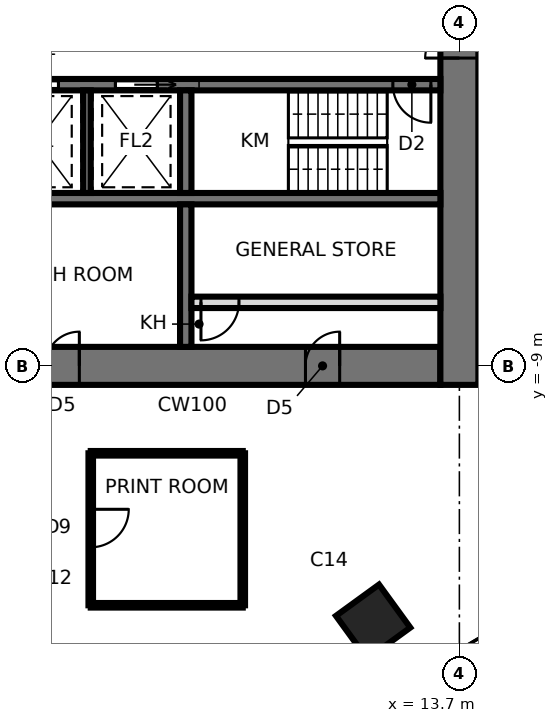
"""IFC4 building model, lengths in metres.
Left out: names, types, materials, properties, quantities, classifications, styles, units other than length and angle.
Written with IfcOpenShell. Run it as: python <this file> out.ifc"""

import sys

from ifc_helpers import new_model, si_unit, direction, frame, frame_2d, origin, origin_2d, place, context, subcontext, project, spatial, rectangle, extrude, element, fill, save


model = new_model("IFC4")
c1 = context("Model", 3, precision=1e-05, world=origin(), true_north=direction((0.0, 1.0)))
c2 = subcontext(c1, "Body", "Model", "MODEL_VIEW")
j1 = project(units=[si_unit("LENGTHUNIT", "METRE"), si_unit("PLANEANGLEUNIT", "RADIAN")], contexts=[c1])
p1 = place(None, origin())
s1 = spatial("IfcSite", under=j1, at=p1, CompositionType="ELEMENT")
p2 = place(p1, origin())
s2 = spatial("IfcBuilding", under=s1, at=p2, CompositionType="ELEMENT")
p3 = place(p2, frame((0.0, 0.0, 234.5)))
s3 = spatial("IfcBuildingStorey", under=s2, at=p3, CompositionType="ELEMENT", Elevation=234.5)
p4 = place(p3, frame((11.43, -15.733, 0.0), z_axis=(0.0, 0.0, 1.0), x_axis=(0.587785252292, -0.809016994375, 0.0)))
e1 = element("IfcColumn", 1, at=p4, inside=s3, PredefinedType="COLUMN", context=c2, shape_type="SweptSolid", body=[
    extrude(rectangle(XDim=1.4, YDim=1.4, at=origin_2d()), origin(), (0.0, 0.0, 1.0), 3.9),
])
p5 = place(p3, frame((-13.2, -9.0, 0.0), z_axis=(0.0, 0.0, 1.0), x_axis=(1.0, 0.0, 0.0)))
e2 = element("IfcWall", 2, at=p5, inside=s3, PredefinedType="SHEAR", context=c2, shape_type="SweptSolid", body=[
    extrude(rectangle(XDim=26.4, YDim=1.0, at=frame_2d((13.2, 0.0))), origin(), (0.0, 0.0, 1.0), 3.9),
])
p6 = place(p5, frame((2.65, 0.0, 0.0)))
e3 = element("IfcOpeningElement", 3, at=p6, cuts=e2, PredefinedType="OPENING", context=c2, shape_type="SweptSolid", body=[
    extrude(rectangle(XDim=0.9, YDim=2.1, at=frame_2d((0.45, 1.05))), frame((0.0, 0.51, 0.0), z_axis=(0.0, -1.0, 0.0), x_axis=(1.0, 0.0, 0.0)), (0.0, 0.0, 1.0), 1.02),
])
p7 = place(p5, frame((9.5, 0.0, 0.0)))
e4 = element("IfcOpeningElement", 4, at=p7, cuts=e2, PredefinedType="OPENING", context=c2, shape_type="SweptSolid", body=[
    extrude(rectangle(XDim=0.9, YDim=2.1, at=frame_2d((0.45, 1.05))), frame((0.0, 0.51, 0.0), z_axis=(0.0, -1.0, 0.0), x_axis=(1.0, 0.0, 0.0)), (0.0, 0.0, 1.0), 1.02),
])
p8 = place(p5, frame((16.0, 0.0, 0.0)))
e5 = element("IfcOpeningElement", 5, at=p8, cuts=e2, PredefinedType="OPENING", context=c2, shape_type="SweptSolid", body=[
    extrude(rectangle(XDim=0.9, YDim=2.1, at=frame_2d((0.45, 1.05))), frame((0.0, 0.51, 0.0), z_axis=(0.0, -1.0, 0.0), x_axis=(1.0, 0.0, 0.0)), (0.0, 0.0, 1.0), 1.02),
])
p9 = place(p5, frame((22.85, 0.0, 0.0)))
e6 = element("IfcOpeningElement", 6, at=p9, cuts=e2, PredefinedType="OPENING", context=c2, shape_type="SweptSolid", body=[
    extrude(rectangle(XDim=0.9, YDim=2.1, at=frame_2d((0.45, 1.05))), frame((0.0, 0.51, 0.0), z_axis=(0.0, -1.0, 0.0), x_axis=(1.0, 0.0, 0.0)), (0.0, 0.0, 1.0), 1.02),
])
p10 = place(p3, frame((13.7, -9.5, 0.0), z_axis=(0.0, 0.0, 1.0), x_axis=(0.0, 1.0, 0.0)))
e7 = element("IfcWall", 7, at=p10, inside=s3, PredefinedType="SHEAR", context=c2, shape_type="SweptSolid", body=[
    extrude(rectangle(XDim=19.0, YDim=1.0, at=frame_2d((9.5, 0.0))), origin(), (0.0, 0.0, 1.0), 3.9),
])
p11 = place(p10, frame((8.6, 0.0, 0.0)))
e8 = element("IfcOpeningElement", 8, at=p11, cuts=e7, PredefinedType="OPENING", context=c2, shape_type="SweptSolid", body=[
    extrude(rectangle(XDim=1.8, YDim=2.4, at=frame_2d((0.9, 1.2))), frame((0.0, 0.51, 0.0), z_axis=(0.0, -1.0, 0.0), x_axis=(1.0, 0.0, 0.0)), (0.0, 0.0, 1.0), 1.02),
])
p12 = place(p3, frame((-13.2, -1.6, 0.0), z_axis=(0.0, 0.0, 1.0), x_axis=(1.0, 0.0, 0.0)))
e9 = element("IfcWall", 9, at=p12, inside=s3, PredefinedType="SHEAR", context=c2, shape_type="SweptSolid", body=[
    extrude(rectangle(XDim=26.4, YDim=0.3, at=frame_2d((13.2, 0.0))), origin(), (0.0, 0.0, 1.0), 3.9),
])
p13 = place(p12, frame((25.15, 0.0, 0.0)))
e10 = element("IfcOpeningElement", 10, at=p13, cuts=e9, PredefinedType="OPENING", context=c2, shape_type="SweptSolid", body=[
    extrude(rectangle(XDim=1.0, YDim=2.1, at=frame_2d((0.5, 1.05))), frame((0.0, 0.16, 0.0), z_axis=(0.0, -1.0, 0.0), x_axis=(1.0, 0.0, 0.0)), (0.0, 0.0, 1.0), 0.32),
])
p14 = place(p12, frame((7.55, 0.0, 0.0)))
e11 = element("IfcOpeningElement", 11, at=p14, cuts=e9, PredefinedType="OPENING", context=c2, shape_type="SweptSolid", body=[
    extrude(rectangle(XDim=0.9, YDim=2.1, at=frame_2d((0.45, 1.05))), frame((0.0, 0.16, 0.0), z_axis=(0.0, -1.0, 0.0), x_axis=(1.0, 0.0, 0.0)), (0.0, 0.0, 1.0), 0.32),
])
p15 = place(p12, frame((10.15, 0.0, 0.0)))
e12 = element("IfcOpeningElement", 12, at=p15, cuts=e9, PredefinedType="OPENING", context=c2, shape_type="SweptSolid", body=[
    extrude(rectangle(XDim=0.9, YDim=2.1, at=frame_2d((0.45, 1.05))), frame((0.0, 0.16, 0.0), z_axis=(0.0, -1.0, 0.0), x_axis=(1.0, 0.0, 0.0)), (0.0, 0.0, 1.0), 0.32),
])
p16 = place(p12, frame((12.75, 0.0, 0.0)))
e13 = element("IfcOpeningElement", 13, at=p16, cuts=e9, PredefinedType="OPENING", context=c2, shape_type="SweptSolid", body=[
    extrude(rectangle(XDim=0.9, YDim=2.1, at=frame_2d((0.45, 1.05))), frame((0.0, 0.16, 0.0), z_axis=(0.0, -1.0, 0.0), x_axis=(1.0, 0.0, 0.0)), (0.0, 0.0, 1.0), 0.32),
])
p17 = place(p12, frame((15.25, 0.0, 0.0)))
e14 = element("IfcOpeningElement", 14, at=p17, cuts=e9, PredefinedType="OPENING", context=c2, shape_type="SweptSolid", body=[
    extrude(rectangle(XDim=1.1, YDim=2.3, at=frame_2d((0.55, 1.15))), frame((0.0, 0.16, 0.0), z_axis=(0.0, -1.0, 0.0), x_axis=(1.0, 0.0, 0.0)), (0.0, 0.0, 1.0), 0.32),
])
p18 = place(p12, frame((17.85, 0.0, 0.0)))
e15 = element("IfcOpeningElement", 15, at=p18, cuts=e9, PredefinedType="OPENING", context=c2, shape_type="SweptSolid", body=[
    extrude(rectangle(XDim=1.1, YDim=2.3, at=frame_2d((0.55, 1.15))), frame((0.0, 0.16, 0.0), z_axis=(0.0, -1.0, 0.0), x_axis=(1.0, 0.0, 0.0)), (0.0, 0.0, 1.0), 0.32),
])
p19 = place(p12, frame((4.85, 0.0, 0.0)))
e16 = element("IfcOpeningElement", 16, at=p19, cuts=e9, PredefinedType="OPENING", context=c2, shape_type="SweptSolid", body=[
    extrude(rectangle(XDim=1.1, YDim=2.3, at=frame_2d((0.55, 1.15))), frame((0.0, 0.16, 0.0), z_axis=(0.0, -1.0, 0.0), x_axis=(1.0, 0.0, 0.0)), (0.0, 0.0, 1.0), 0.32),
])
p20 = place(p12, frame((2.25, 0.0, 0.0)))
e17 = element("IfcOpeningElement", 17, at=p20, cuts=e9, PredefinedType="OPENING", context=c2, shape_type="SweptSolid", body=[
    extrude(rectangle(XDim=1.1, YDim=2.3, at=frame_2d((0.55, 1.15))), frame((0.0, 0.16, 0.0), z_axis=(0.0, -1.0, 0.0), x_axis=(1.0, 0.0, 0.0)), (0.0, 0.0, 1.0), 0.32),
])
p21 = place(p12, frame((0.35, 0.0, 0.0)))
e18 = element("IfcOpeningElement", 18, at=p21, cuts=e9, PredefinedType="OPENING", context=c2, shape_type="SweptSolid", body=[
    extrude(rectangle(XDim=0.9, YDim=2.1, at=frame_2d((0.45, 1.05))), frame((0.0, 0.16, 0.0), z_axis=(0.0, -1.0, 0.0), x_axis=(1.0, 0.0, 0.0)), (0.0, 0.0, 1.0), 0.32),
])
p22 = place(p3, frame((-13.2, -4.6, 0.0), z_axis=(0.0, 0.0, 1.0), x_axis=(1.0, 0.0, 0.0)))
e19 = element("IfcWall", 19, at=p22, inside=s3, PredefinedType="SHEAR", context=c2, shape_type="SweptSolid", body=[
    extrude(rectangle(XDim=26.4, YDim=0.3, at=frame_2d((13.2, 0.0))), origin(), (0.0, 0.0, 1.0), 3.9),
])
p23 = place(p3, frame((6.5, -1.75, 0.0), z_axis=(0.0, 0.0, 1.0), x_axis=(0.0, -1.0, 0.0)))
e20 = element("IfcWall", 20, at=p23, inside=s3, PredefinedType="SHEAR", context=c2, shape_type="SweptSolid", body=[
    extrude(rectangle(XDim=2.7, YDim=0.3, at=frame_2d((1.35, 0.0))), origin(), (0.0, 0.0, 1.0), 3.9),
])
p24 = place(p3, frame((6.5, -4.75, 0.0), z_axis=(0.0, 0.0, 1.0), x_axis=(0.0, -1.0, 0.0)))
e21 = element("IfcWall", 21, at=p24, inside=s3, PredefinedType="SHEAR", context=c2, shape_type="SweptSolid", body=[
    extrude(rectangle(XDim=3.75, YDim=0.3, at=frame_2d((1.875, 0.0))), origin(), (0.0, 0.0, 1.0), 3.9),
])
p25 = place(p3, frame((3.9, -1.75, 0.0), z_axis=(0.0, 0.0, 1.0), x_axis=(0.0, -1.0, 0.0)))
e22 = element("IfcWall", 22, at=p25, inside=s3, PredefinedType="SHEAR", context=c2, shape_type="SweptSolid", body=[
    extrude(rectangle(XDim=2.7, YDim=0.2, at=frame_2d((1.35, 0.0))), origin(), (0.0, 0.0, 1.0), 3.9),
])
p26 = place(p3, frame((6.65, -7.328, 0.0), z_axis=(0.0, 0.0, 1.0), x_axis=(1.0, 0.0, 0.0)))
e23 = element("IfcWall", 23, at=p26, inside=s3, PredefinedType="PARTITIONING", context=c2, shape_type="SweptSolid", body=[
    extrude(rectangle(XDim=6.55, YDim=0.3, at=frame_2d((3.275, 0.0))), origin(), (0.0, 0.0, 1.0), 3.74),
])
p27 = place(p26, frame((0.25, 0.0, 0.0)))
e24 = element("IfcOpeningElement", 24, at=p27, cuts=e23, PredefinedType="OPENING", context=c2, shape_type="SweptSolid", body=[
    extrude(rectangle(XDim=1.0, YDim=2.4, at=frame_2d((0.5, 1.2))), frame((0.0, 0.16, 0.0), z_axis=(0.0, -1.0, 0.0), x_axis=(1.0, 0.0, 0.0)), (0.0, 0.0, 1.0), 0.32),
])
p28 = place(p3, frame((4.0, -15.3, 0.0), z_axis=(0.0, 0.0, 1.0), x_axis=(0.0, 1.0, 0.0)))
e25 = element("IfcWall", 25, at=p28, inside=s3, PredefinedType="PARTITIONING", context=c2, shape_type="SweptSolid", body=[
    extrude(rectangle(XDim=4.0, YDim=0.12, at=frame_2d((2.0, 0.0))), origin(), (0.0, 0.0, 1.0), 3.74),
])
p29 = place(p28, frame((1.526, 0.0, 0.0)))
e26 = element("IfcOpeningElement", 26, at=p29, cuts=e25, PredefinedType="OPENING", context=c2, shape_type="SweptSolid", body=[
    extrude(rectangle(XDim=1.0, YDim=2.4, at=frame_2d((0.5, 1.2))), frame((0.0, 0.07, 0.0), z_axis=(0.0, -1.0, 0.0), x_axis=(1.0, 0.0, 0.0)), (0.0, 0.0, 1.0), 0.14),
])
p30 = place(p3, frame((8.0, -15.3, 0.0), z_axis=(0.0, 0.0, 1.0), x_axis=(-1.0, 0.0, 0.0)))
e27 = element("IfcWall", 27, at=p30, inside=s3, PredefinedType="PARTITIONING", context=c2, shape_type="SweptSolid", body=[
    extrude(rectangle(XDim=4.0, YDim=0.12, at=frame_2d((2.0, 0.0))), origin(), (0.0, 0.0, 1.0), 3.334),
])
for number, where, z_axis, x_axis in (
    (28, (4.0, -11.3, 0.0), (0.0, 0.0, 1.0), (1.0, 0.0, 0.0)),
    (29, (8.0, -11.3, 0.0), (0.0, 0.0, 1.0), (0.0, -1.0, 0.0)),
):
    element("IfcWall", number, at=place(p3, frame(where, z_axis=z_axis, x_axis=x_axis)), inside=s3, PredefinedType="PARTITIONING", context=c2, shape_type="SweptSolid", body=[
        extrude(rectangle(XDim=4.0, YDim=0.12, at=frame_2d((2.0, 0.0))), origin(), (0.0, 0.0, 1.0), 3.74),
    ])
p31 = place(p11, origin())
e30 = element("IfcDoor", 30, at=p31, inside=s3, OperationType="DOUBLE_DOOR_SINGLE_SWING", PredefinedType="DOOR", context=c2, shape_type="SweptSolid", body=[
    extrude(rectangle(XDim=1.72, YDim=2.36, at=frame_2d((0.9, 1.18))), frame((0.0, 0.025, 0.0), z_axis=(0.0, -1.0, 0.0), x_axis=(1.0, 0.0, 0.0)), (0.0, 0.0, 1.0), 0.05),
    extrude(rectangle(XDim=0.04, YDim=2.4, at=frame_2d((0.02, 1.2))), frame((0.0, 0.25, 0.0), z_axis=(0.0, -1.0, 0.0), x_axis=(1.0, 0.0, 0.0)), (0.0, 0.0, 1.0), 0.5),
    extrude(rectangle(XDim=0.04, YDim=2.4, at=frame_2d((1.78, 1.2))), frame((0.0, 0.25, 0.0), z_axis=(0.0, -1.0, 0.0), x_axis=(1.0, 0.0, 0.0)), (0.0, 0.0, 1.0), 0.5),
    extrude(rectangle(XDim=1.72, YDim=0.04, at=frame_2d((0.9, 2.38))), frame((0.0, 0.25, 0.0), z_axis=(0.0, -1.0, 0.0), x_axis=(1.0, 0.0, 0.0)), (0.0, 0.0, 1.0), 0.5),
])
fill(e8, e30)
p32 = place(p13, frame((1.0, 0.0, 0.0), z_axis=(0.0, 0.0, 1.0), x_axis=(-1.0, 0.0, 0.0)))
e31 = element("IfcDoor", 31, at=p32, inside=s3, OperationType="SINGLE_SWING_LEFT", PredefinedType="DOOR", context=c2, shape_type="SweptSolid", body=[
    extrude(rectangle(XDim=1.0, YDim=2.1, at=frame_2d((0.5, 1.05))), frame((0.0, 0.025, 0.0), z_axis=(0.0, -1.0, 0.0), x_axis=(1.0, 0.0, 0.0)), (0.0, 0.0, 1.0), 0.05),
])
fill(e10, e31)
p33 = place(p17, frame((1.1, 0.0, 0.0), z_axis=(0.0, 0.0, 1.0), x_axis=(-1.0, 0.0, 0.0)))
e32 = element("IfcDoor", 32, at=p33, inside=s3, OperationType="SLIDING_TO_RIGHT", PredefinedType="DOOR", context=c2, shape_type="SweptSolid", body=[
    extrude(rectangle(XDim=1.1, YDim=2.3, at=frame_2d((0.55, 1.15))), frame((0.0, 0.025, 0.0), z_axis=(0.0, -1.0, 0.0), x_axis=(1.0, 0.0, 0.0)), (0.0, 0.0, 1.0), 0.05),
])
fill(e14, e32)
p34 = place(p18, frame((1.1, 0.0, 0.0), z_axis=(0.0, 0.0, 1.0), x_axis=(-1.0, 0.0, 0.0)))
e33 = element("IfcDoor", 33, at=p34, inside=s3, OperationType="SLIDING_TO_LEFT", PredefinedType="DOOR", context=c2, shape_type="SweptSolid", body=[
    extrude(rectangle(XDim=1.1, YDim=2.3, at=frame_2d((0.55, 1.15))), frame((0.0, 0.025, 0.0), z_axis=(0.0, -1.0, 0.0), x_axis=(1.0, 0.0, 0.0)), (0.0, 0.0, 1.0), 0.05),
])
fill(e15, e33)
p35 = place(p8, origin())
e34 = element("IfcDoor", 34, at=p35, inside=s3, OperationType="SINGLE_SWING_RIGHT", PredefinedType="DOOR", context=c2, shape_type="SweptSolid", body=[
    extrude(rectangle(XDim=0.82, YDim=2.06, at=frame_2d((0.45, 1.03))), frame((0.0, 0.025, 0.0), z_axis=(0.0, -1.0, 0.0), x_axis=(1.0, 0.0, 0.0)), (0.0, 0.0, 1.0), 0.05),
    extrude(rectangle(XDim=0.04, YDim=2.1, at=frame_2d((0.02, 1.05))), frame((0.0, 0.25, 0.0), z_axis=(0.0, -1.0, 0.0), x_axis=(1.0, 0.0, 0.0)), (0.0, 0.0, 1.0), 0.5),
    extrude(rectangle(XDim=0.04, YDim=2.1, at=frame_2d((0.88, 1.05))), frame((0.0, 0.25, 0.0), z_axis=(0.0, -1.0, 0.0), x_axis=(1.0, 0.0, 0.0)), (0.0, 0.0, 1.0), 0.5),
    extrude(rectangle(XDim=0.82, YDim=0.04, at=frame_2d((0.45, 2.08))), frame((0.0, 0.25, 0.0), z_axis=(0.0, -1.0, 0.0), x_axis=(1.0, 0.0, 0.0)), (0.0, 0.0, 1.0), 0.5),
])
fill(e5, e34)
p36 = place(p9, origin())
e35 = element("IfcDoor", 35, at=p36, inside=s3, OperationType="SINGLE_SWING_RIGHT", PredefinedType="DOOR", context=c2, shape_type="SweptSolid", body=[
    extrude(rectangle(XDim=0.82, YDim=2.06, at=frame_2d((0.45, 1.03))), frame((0.0, 0.025, 0.0), z_axis=(0.0, -1.0, 0.0), x_axis=(1.0, 0.0, 0.0)), (0.0, 0.0, 1.0), 0.05),
    extrude(rectangle(XDim=0.04, YDim=2.1, at=frame_2d((0.02, 1.05))), frame((0.0, 0.25, 0.0), z_axis=(0.0, -1.0, 0.0), x_axis=(1.0, 0.0, 0.0)), (0.0, 0.0, 1.0), 0.5),
    extrude(rectangle(XDim=0.04, YDim=2.1, at=frame_2d((0.88, 1.05))), frame((0.0, 0.25, 0.0), z_axis=(0.0, -1.0, 0.0), x_axis=(1.0, 0.0, 0.0)), (0.0, 0.0, 1.0), 0.5),
    extrude(rectangle(XDim=0.82, YDim=0.04, at=frame_2d((0.45, 2.08))), frame((0.0, 0.25, 0.0), z_axis=(0.0, -1.0, 0.0), x_axis=(1.0, 0.0, 0.0)), (0.0, 0.0, 1.0), 0.5),
])
fill(e6, e35)
p37 = place(p27, frame((1.0, 0.0, 0.0), z_axis=(0.0, 0.0, 1.0), x_axis=(-1.0, 0.0, 0.0)))
e36 = element("IfcDoor", 36, at=p37, inside=s3, OperationType="SINGLE_SWING_RIGHT", PredefinedType="DOOR", context=c2, shape_type="SweptSolid", body=[
    extrude(rectangle(XDim=1.0, YDim=2.4, at=frame_2d((0.5, 1.2))), frame((0.0, 0.025, 0.0), z_axis=(0.0, -1.0, 0.0), x_axis=(1.0, 0.0, 0.0)), (0.0, 0.0, 1.0), 0.05),
])
fill(e24, e36)
p38 = place(p29, frame((1.0, 0.0, 0.0), z_axis=(0.0, 0.0, 1.0), x_axis=(-1.0, 0.0, 0.0)))
e37 = element("IfcDoor", 37, at=p38, inside=s3, OperationType="SINGLE_SWING_LEFT", PredefinedType="DOOR", context=c2, shape_type="SweptSolid", body=[
    extrude(rectangle(XDim=1.0, YDim=2.4, at=frame_2d((0.5, 1.2))), frame((0.0, 0.025, 0.0), z_axis=(0.0, -1.0, 0.0), x_axis=(1.0, 0.0, 0.0)), (0.0, 0.0, 1.0), 0.05),
])
fill(e26, e37)
save(model, sys.argv[1])
